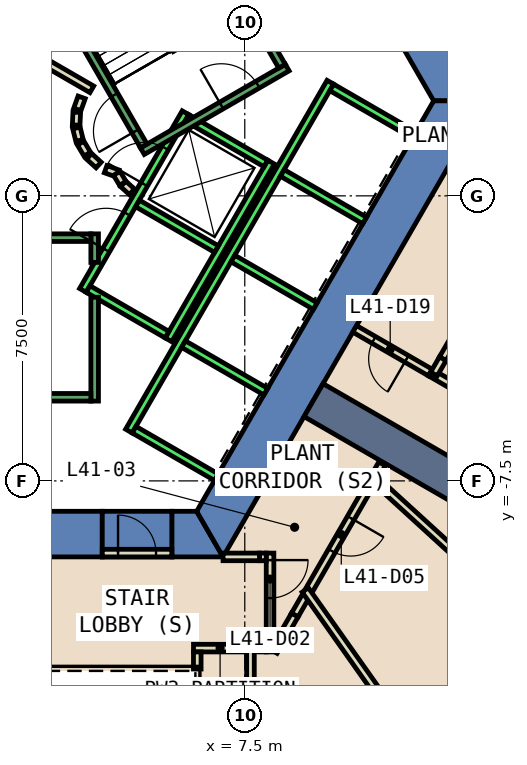
"""IFC4 building model, lengths in metres.
Left out: names, types, materials, properties, quantities, classifications, styles, units other than length and angle.
Written with IfcOpenShell. Run it as: python <this file> out.ifc"""

import sys

from ifc_helpers import new_model, si_unit, direction, frame, frame_2d, origin, place, context, subcontext, project, spatial, polyline, rectangle, outline, extrude, element, fill, save


model = new_model("IFC4")
c1 = context("Model", 3, precision=1e-05, world=origin(), true_north=direction((0.0, 1.0)))
c2 = subcontext(c1, "Body", "Model", "MODEL_VIEW")
j1 = project(units=[si_unit("LENGTHUNIT", "METRE"), si_unit("PLANEANGLEUNIT", "RADIAN")], contexts=[c1])
p1 = place(None, origin())
s1 = spatial("IfcSite", under=j1, at=p1, CompositionType="ELEMENT")
p2 = place(p1, origin())
s2 = spatial("IfcBuilding", under=s1, at=p2, CompositionType="ELEMENT")
p3 = place(p2, frame((0.0, 0.0, 184.4)))
s3 = spatial("IfcBuildingStorey", under=s2, at=p3, CompositionType="ELEMENT", Elevation=184.4)
p4 = place(p3, frame((0.0, 0.0, -0.6)))
e1 = element("IfcWall", 1, at=p4, inside=s3, PredefinedType="SHEAR", context=c2, shape_type="SweptSolid", body=[
    extrude(outline(polyline([(8.517, 11.747), (7.478, 11.147), (12.471, 2.5), (13.856, 2.5), (8.517, 11.747)])), origin(), (0.0, 0.0, 1.0), 5.4),
])
p5 = place(p3, frame((0.0, 0.0, -0.6)))
e2 = element("IfcWall", 2, at=p5, inside=s3, PredefinedType="SHEAR", context=c2, shape_type="SweptSolid", body=[
    extrude(outline(polyline([(3.75, -9.5), (3.75, -8.3), (-6.235, -8.3), (-6.928, -9.5), (3.75, -9.5)])), origin(), (0.0, 0.0, 1.0), 5.4),
])
p6 = place(p3, frame((0.0, 0.0, -0.6)))
e3 = element("IfcWall", 3, at=p6, inside=s3, PredefinedType="SHEAR", context=c2, shape_type="SweptSolid", body=[
    extrude(outline(polyline([(5.58, -8.3), (5.58, -9.5), (6.928, -9.5), (6.235, -8.3), (5.58, -8.3)])), origin(), (0.0, 0.0, 1.0), 5.4),
])
p7 = place(p3, frame((0.0, 0.0, 3.6)))
e4 = element("IfcWall", 4, at=p7, inside=s3, PredefinedType="SHEAR", context=c2, shape_type="SweptSolid", body=[
    extrude(outline(polyline([(5.58, -9.5), (5.58, -8.3), (3.75, -8.3), (3.75, -9.5), (5.58, -9.5)])), origin(), (0.0, 0.0, 1.0), 1.2),
])
p8 = place(p3, frame((0.0, 0.0, -0.6)))
e5 = element("IfcWall", 5, at=p8, inside=s3, PredefinedType="SHEAR", context=c2, shape_type="SweptSolid", body=[
    extrude(outline(polyline([(6.928, -9.5), (13.856, 2.5), (12.471, 2.5), (6.235, -8.3), (6.928, -9.5)])), origin(), (0.0, 0.0, 1.0), 5.4),
])
p9 = place(p3, frame((9.31, -5.375, 0.0), z_axis=(0.0, 0.0, 1.0), x_axis=(0.866015103238, -0.500017840646, 0.0)))
e6 = element("IfcWall", 6, at=p9, inside=s3, PredefinedType="SHEAR", context=c2, shape_type="SweptSolid", body=[
    extrude(rectangle(XDim=27.139, YDim=1.0, at=frame_2d((13.57, 0.0))), origin(), (0.0, 0.0, 1.0), 4.8),
])
p10 = place(p3, frame((1.866, 3.732, 0.0), z_axis=(0.0, 0.0, 1.0), x_axis=(0.866043361281, -0.499968895414, 0.0)))
e7 = element("IfcWall", 7, at=p10, inside=s3, PredefinedType="PARTITIONING", context=c2, shape_type="SweptSolid", body=[
    extrude(rectangle(XDim=1.858, YDim=0.2, at=frame_2d((0.929, 0.0))), origin(), (0.0, 0.0, 1.0), 4.8),
])
p11 = place(p3, frame((3.208, 2.592, 0.0), z_axis=(0.0, 0.0, 1.0), x_axis=(-0.337388820924, -0.941365382578, 0.0)))
e8 = element("IfcWall", 8, at=p11, inside=s3, PredefinedType="PARTITIONING", context=c2, shape_type="SweptSolid", body=[
    extrude(rectangle(XDim=0.338, YDim=0.2, at=frame_2d((0.169, 0.0))), origin(), (0.0, 0.0, 1.0), 4.8),
])
p12 = place(p3, frame((3.079, 2.199, 0.0), z_axis=(0.0, 0.0, 1.0), x_axis=(-0.047771483479, -0.998858290933, 0.0)))
e9 = element("IfcWall", 9, at=p12, inside=s3, PredefinedType="PARTITIONING", context=c2, shape_type="SweptSolid", body=[
    extrude(rectangle(XDim=0.337, YDim=0.2, at=frame_2d((0.169, 0.0))), origin(), (0.0, 0.0, 1.0), 4.8),
])
p13 = place(p3, frame((3.07, 1.786, 0.0), z_axis=(0.0, 0.0, 1.0), x_axis=(0.242705583207, -0.970099994784, 0.0)))
e10 = element("IfcWall", 10, at=p13, inside=s3, PredefinedType="PARTITIONING", context=c2, shape_type="SweptSolid", body=[
    extrude(rectangle(XDim=0.338, YDim=0.2, at=frame_2d((0.169, 0.0))), origin(), (0.0, 0.0, 1.0), 4.8),
])
for number, where, z_axis, x_axis in (
    (11, (3.182, 1.388, 0.0), (0.0, 0.0, 1.0), (0.512, -0.859, 0.0)),
    (12, (3.404, 1.039, 0.0), (0.0, 0.0, 1.0), (0.74, -0.672, 0.0)),
):
    element("IfcWall", number, at=place(p3, frame(where, z_axis=z_axis, x_axis=x_axis)), inside=s3, PredefinedType="PARTITIONING", context=c2, shape_type="SweptSolid", body=[
        extrude(rectangle(XDim=0.338, YDim=0.2, at=frame_2d((0.169, 0.0))), origin(), (0.0, 0.0, 1.0), 4.8),
    ])
p14 = place(p3, frame((3.838, 0.702, 0.0), z_axis=(0.0, 0.0, 1.0), x_axis=(0.941035081519, -0.338308993895, 0.0)))
e13 = element("IfcWall", 13, at=p14, inside=s3, PredefinedType="PARTITIONING", context=c2, shape_type="SweptSolid", body=[
    extrude(rectangle(XDim=0.337, YDim=0.2, at=frame_2d((0.168, 0.0))), origin(), (0.0, 0.0, 1.0), 4.8),
])
p15 = place(p3, frame((4.132, 0.593, 0.0), z_axis=(0.0, 0.0, 1.0), x_axis=(0.513561617048, -0.858052717201, 0.0)))
e14 = element("IfcWall", 14, at=p15, inside=s3, PredefinedType="PARTITIONING", context=c2, shape_type="SweptSolid", body=[
    extrude(rectangle(XDim=0.308, YDim=0.2, at=frame_2d((0.154, 0.0))), origin(), (0.0, 0.0, 1.0), 4.8),
])
p16 = place(p3, frame((4.301, 0.315, 0.0), z_axis=(0.0, 0.0, 1.0), x_axis=(0.741798017506, -0.670623367639, 0.0)))
e15 = element("IfcWall", 15, at=p16, inside=s3, PredefinedType="PARTITIONING", context=c2, shape_type="SweptSolid", body=[
    extrude(rectangle(XDim=0.309, YDim=0.2, at=frame_2d((0.154, 0.0))), origin(), (0.0, 0.0, 1.0), 4.8),
])
p17 = place(p3, frame((7.55, -11.9, 0.0), z_axis=(0.0, 0.0, 1.0), x_axis=(-1.0, 0.0, 0.0)))
e16 = element("IfcWall", 16, at=p17, inside=s3, PredefinedType="PARTITIONING", context=c2, shape_type="SweptSolid", body=[
    extrude(rectangle(XDim=1.399, YDim=0.2, at=frame_2d((0.7, 0.0))), origin(), (0.0, 0.0, 1.0), 4.8),
])
p18 = place(p3, frame((6.25, -12.0, 0.0), z_axis=(0.0, 0.0, 1.0), x_axis=(0.0, -1.0, 0.0)))
e17 = element("IfcWall", 17, at=p18, inside=s3, PredefinedType="PARTITIONING", context=c2, shape_type="SweptSolid", body=[
    extrude(rectangle(XDim=0.45, YDim=0.2, at=frame_2d((0.225, 0.0))), origin(), (0.0, 0.0, 1.0), 4.8),
])
p19 = place(p3, frame((6.928, -9.5, 0.0), z_axis=(0.0, 0.0, 1.0), x_axis=(1.0, 0.0, 0.0)))
e18 = element("IfcWall", 18, at=p19, inside=s3, PredefinedType="PARTITIONING", context=c2, shape_type="SweptSolid", body=[
    extrude(rectangle(XDim=0.962, YDim=0.2, at=frame_2d((0.481, 0.0))), origin(), (0.0, 0.0, 1.0), 2.4),
])
p20 = place(p3, frame((8.165, -9.4, 0.0), z_axis=(0.0, 0.0, 1.0), x_axis=(0.0, -1.0, 0.0)))
e19 = element("IfcWall", 19, at=p20, inside=s3, PredefinedType="PARTITIONING", context=c2, shape_type="SweptSolid", body=[
    extrude(rectangle(XDim=2.6, YDim=0.2, at=frame_2d((1.3, 0.0))), origin(), (0.0, 0.0, 1.0), 4.8),
])
p21 = place(p20, frame((0.184, 0.0, 0.0)))
e20 = element("IfcOpeningElement", 20, at=p21, cuts=e19, PredefinedType="OPENING", context=c2, shape_type="SweptSolid", body=[
    extrude(rectangle(XDim=1.0, YDim=2.1, at=frame_2d((0.5, 1.05))), frame((0.0, 0.11, 0.0), z_axis=(0.0, -1.0, 0.0), x_axis=(1.0, 0.0, 0.0)), (0.0, 0.0, 1.0), 0.22),
])
p22 = place(p3, frame((8.065, -11.9, 0.0), z_axis=(0.0, 0.0, 1.0), x_axis=(-1.0, 0.0, 0.0)))
e21 = element("IfcWall", 21, at=p22, inside=s3, PredefinedType="PARTITIONING", context=c2, shape_type="SweptSolid", body=[
    extrude(rectangle(XDim=0.315, YDim=0.2, at=frame_2d((0.157, 0.0))), origin(), (0.0, 0.0, 1.0), 4.8),
])
p23 = place(p3, frame((7.65, -11.8, 0.0), z_axis=(0.0, 0.0, 1.0), x_axis=(0.0, -1.0, 0.0)))
e22 = element("IfcWall", 22, at=p23, inside=s3, PredefinedType="PARTITIONING", context=c2, shape_type="SweptSolid", body=[
    extrude(rectangle(XDim=13.349, YDim=0.2, at=frame_2d((6.674, 0.0))), origin(), (0.0, 0.0, 1.0), 4.8),
])
p24 = place(p23, frame((6.867, 0.0, 0.0)))
e23 = element("IfcOpeningElement", 23, at=p24, cuts=e22, PredefinedType="OPENING", context=c2, shape_type="SweptSolid", body=[
    extrude(rectangle(XDim=1.0, YDim=2.1, at=frame_2d((0.5, 1.05))), frame((0.0, 0.11, 0.0), z_axis=(0.0, -1.0, 0.0), x_axis=(1.0, 0.0, 0.0)), (0.0, 0.0, 1.0), 0.22),
])
p25 = place(p3, frame((9.15, -10.451, 0.0), z_axis=(0.0, 0.0, 1.0), x_axis=(-0.499595985407, -0.8662585361, 0.0)))
e24 = element("IfcWall", 24, at=p25, inside=s3, PredefinedType="PARTITIONING", context=c2, shape_type="SweptSolid", body=[
    extrude(rectangle(XDim=0.668, YDim=0.2, at=frame_2d((0.334, 0.0))), origin(), (0.0, 0.0, 1.0), 4.8),
])
p26 = place(p3, frame((10.89, -7.437, 0.0), z_axis=(0.0, 0.0, 1.0), x_axis=(-0.499979528911, -0.866037222451, 0.0)))
e25 = element("IfcWall", 25, at=p26, inside=s3, PredefinedType="PARTITIONING", context=c2, shape_type="SweptSolid", body=[
    extrude(rectangle(XDim=3.48, YDim=0.2, at=frame_2d((1.74, 0.0))), origin(), (0.0, 0.0, 1.0), 4.8),
])
p27 = place(p26, frame((1.202, 0.0, 0.0)))
e26 = element("IfcOpeningElement", 26, at=p27, cuts=e25, PredefinedType="OPENING", context=c2, shape_type="SweptSolid", body=[
    extrude(rectangle(XDim=1.0, YDim=2.1, at=frame_2d((0.5, 1.05))), frame((0.0, 0.11, 0.0), z_axis=(0.0, -1.0, 0.0), x_axis=(1.0, 0.0, 0.0)), (0.0, 0.0, 1.0), 0.22),
])
p28 = place(p3, frame((11.113, -7.051, 0.0), z_axis=(0.0, 0.0, 1.0), x_axis=(-0.499207881238, -0.866482251007, 0.0)))
e27 = element("IfcWall", 27, at=p28, inside=s3, PredefinedType="PARTITIONING", context=c2, shape_type="SweptSolid", body=[
    extrude(rectangle(XDim=0.411, YDim=0.2, at=frame_2d((0.206, 0.0))), origin(), (0.0, 0.0, 1.0), 2.4),
])
p29 = place(p3, frame((9.092, -10.37, 0.0), z_axis=(0.0, 0.0, 1.0), x_axis=(0.57710323801, -0.816671202308, 0.0)))
e28 = element("IfcWall", 28, at=p29, inside=s3, PredefinedType="PARTITIONING", context=c2, shape_type="SweptSolid", body=[
    extrude(rectangle(XDim=19.393, YDim=0.2, at=frame_2d((9.697, 0.0))), origin(), (0.0, 0.0, 1.0), 4.8),
])
p30 = place(p3, frame((10.816, -7.37, 0.0), z_axis=(0.0, 0.0, 1.0), x_axis=(0.738734088882, -0.673996992519, 0.0)))
e29 = element("IfcWall", 29, at=p30, inside=s3, PredefinedType="PARTITIONING", context=c2, shape_type="SweptSolid", body=[
    extrude(rectangle(XDim=13.69, YDim=0.2, at=frame_2d((6.845, 0.0))), origin(), (0.0, 0.0, 1.0), 2.4),
])
p31 = place(p3, frame((12.384, -4.65, 0.0), z_axis=(0.0, 0.0, 1.0), x_axis=(-0.866053019151, 0.499952165731, 0.0)))
e30 = element("IfcWall", 30, at=p31, inside=s3, PredefinedType="PARTITIONING", context=c2, shape_type="SweptSolid", body=[
    extrude(rectangle(XDim=2.3, YDim=0.2, at=frame_2d((1.15, 0.0))), origin(), (0.0, 0.0, 1.0), 4.8),
])
p32 = place(p31, frame((0.721, 0.0, 0.0)))
e31 = element("IfcOpeningElement", 31, at=p32, cuts=e30, PredefinedType="OPENING", context=c2, shape_type="SweptSolid", body=[
    extrude(rectangle(XDim=1.0, YDim=2.1, at=frame_2d((0.5, 1.05))), frame((0.0, 0.11, 0.0), z_axis=(0.0, -1.0, 0.0), x_axis=(1.0, 0.0, 0.0)), (0.0, 0.0, 1.0), 0.22),
])
p33 = place(p3, frame((12.384, -4.65, 0.0), z_axis=(0.0, 0.0, 1.0), x_axis=(0.866042267005, -0.499970790907, 0.0)))
e32 = element("IfcWall", 32, at=p33, inside=s3, PredefinedType="PARTITIONING", context=c2, shape_type="SweptSolid", body=[
    extrude(rectangle(XDim=25.02, YDim=0.2, at=frame_2d((12.51, 0.0))), origin(), (0.0, 0.0, 1.0), 4.8),
])
p34 = place(p3, frame((3.75, -9.4, 0.0), z_axis=(0.0, 0.0, 1.0), x_axis=(1.0, 0.0, 0.0)))
e33 = element("IfcWall", 33, at=p34, inside=s3, PredefinedType="PARTITIONING", context=c2, shape_type="SweptSolid", body=[
    extrude(rectangle(XDim=1.83, YDim=0.2, at=frame_2d((0.915, 0.0))), origin(), (0.0, 0.0, 1.0), 2.4),
])
p35 = place(p34, frame((0.415, 0.0, 0.0)))
e34 = element("IfcOpeningElement", 34, at=p35, cuts=e33, PredefinedType="OPENING", context=c2, shape_type="SweptSolid", body=[
    extrude(rectangle(XDim=1.0, YDim=2.1, at=frame_2d((0.5, 1.05))), frame((0.0, 0.11, 0.0), z_axis=(0.0, -1.0, 0.0), x_axis=(1.0, 0.0, 0.0)), (0.0, 0.0, 1.0), 0.22),
])
p36 = place(p3, frame((7.89, -9.5, 0.0), z_axis=(0.0, 0.0, 1.0), x_axis=(1.0, 0.0, 0.0)))
e35 = element("IfcWall", 35, at=p36, inside=s3, PredefinedType="PARTITIONING", context=c2, shape_type="SweptSolid", body=[
    extrude(rectangle(XDim=0.175, YDim=0.2, at=frame_2d((0.087, 0.0))), origin(), (0.0, 0.0, 1.0), 4.8),
])
p37 = place(p3, frame((8.816, -11.03, 0.0), z_axis=(0.0, 0.0, 1.0), x_axis=(-0.499633176362, -0.866237085952, 0.0)))
e36 = element("IfcWall", 36, at=p37, inside=s3, PredefinedType="PARTITIONING", context=c2, shape_type="SweptSolid", body=[
    extrude(rectangle(XDim=1.105, YDim=0.2, at=frame_2d((0.552, 0.0))), origin(), (0.0, 0.0, 1.0), 2.4),
])
p38 = place(p3, frame((13.168, -3.493, 0.0), z_axis=(0.0, 0.0, 1.0), x_axis=(-0.500153222552, -0.865936922628, 0.0)))
e37 = element("IfcWall", 37, at=p38, inside=s3, PredefinedType="PARTITIONING", context=c2, shape_type="SweptSolid", body=[
    extrude(rectangle(XDim=0.916, YDim=0.2, at=frame_2d((0.458, 0.0))), origin(), (0.0, 0.0, 1.0), 2.4),
])
p39 = place(p3, frame((12.71, -4.286, 0.0), z_axis=(0.0, 0.0, 1.0), x_axis=(-0.500558482794, -0.8657027234, 0.0)))
e38 = element("IfcWall", 38, at=p39, inside=s3, PredefinedType="PARTITIONING", context=c2, shape_type="SweptSolid", body=[
    extrude(rectangle(XDim=0.463, YDim=0.2, at=frame_2d((0.232, 0.0))), origin(), (0.0, 0.0, 1.0), 4.8),
])
p40 = place(p3, frame((3.24, -2.488, 0.0), z_axis=(0.0, 0.0, 1.0), x_axis=(0.500034260056, 0.866005622828, 0.0)))
e39 = element("IfcWall", 39, at=p40, inside=s3, PredefinedType="STANDARD", context=c2, shape_type="SweptSolid", body=[
    extrude(rectangle(XDim=5.399, YDim=0.2, at=frame_2d((2.7, 0.0))), origin(), (0.0, 0.0, 1.0), 4.8),
])
p41 = place(p40, frame((3.225, 0.0, 0.0)))
e40 = element("IfcOpeningElement", 40, at=p41, cuts=e39, PredefinedType="OPENING", context=c2, shape_type="SweptSolid", body=[
    extrude(rectangle(XDim=1.1, YDim=2.1, at=frame_2d((0.55, 1.05))), frame((0.0, 0.11, 0.0), z_axis=(0.0, -1.0, 0.0), x_axis=(1.0, 0.0, 0.0)), (0.0, 0.0, 1.0), 0.22),
])
p42 = place(p40, frame((1.225, 0.0, 0.0)))
e41 = element("IfcOpeningElement", 41, at=p42, cuts=e39, PredefinedType="OPENING", context=c2, shape_type="SweptSolid", body=[
    extrude(rectangle(XDim=1.1, YDim=2.1, at=frame_2d((0.55, 1.05))), frame((0.0, 0.11, 0.0), z_axis=(0.0, -1.0, 0.0), x_axis=(1.0, 0.0, 0.0)), (0.0, 0.0, 1.0), 0.22),
])
p43 = place(p3, frame((5.492, -3.788, 0.0), z_axis=(0.0, 0.0, 1.0), x_axis=(0.500034260056, 0.866005622828, 0.0)))
e42 = element("IfcWall", 42, at=p43, inside=s3, PredefinedType="STANDARD", context=c2, shape_type="SweptSolid", body=[
    extrude(rectangle(XDim=5.399, YDim=0.2, at=frame_2d((2.7, 0.0))), origin(), (0.0, 0.0, 1.0), 4.8),
])
p44 = place(p3, frame((3.377, -2.452, 0.0), z_axis=(0.0, 0.0, 1.0), x_axis=(0.865955154139, -0.50012165622, 0.0)))
e43 = element("IfcWall", 43, at=p44, inside=s3, PredefinedType="STANDARD", context=c2, shape_type="SweptSolid", body=[
    extrude(rectangle(XDim=2.4, YDim=0.2, at=frame_2d((1.2, 0.0))), origin(), (0.0, 0.0, 1.0), 4.8),
])
for number, where, z_axis, x_axis in (
    (44, (4.677, -0.2, 0.0), (0.0, 0.0, 1.0), (0.866, -0.5, 0.0)),
    (45, (5.977, 2.052, 0.0), (0.0, 0.0, 1.0), (0.866, -0.5, 0.0)),
):
    element("IfcWall", number, at=place(p3, frame(where, z_axis=z_axis, x_axis=x_axis)), inside=s3, PredefinedType="STANDARD", context=c2, shape_type="SweptSolid", body=[
        extrude(rectangle(XDim=2.399, YDim=0.2, at=frame_2d((1.2, 0.0))), origin(), (0.0, 0.0, 1.0), 4.8),
    ])
p45 = place(p3, frame((4.451, -6.19, 0.0), z_axis=(0.0, 0.0, 1.0), x_axis=(0.50000090737, 0.866024879913, 0.0)))
e46 = element("IfcWall", 46, at=p45, inside=s3, PredefinedType="STANDARD", context=c2, shape_type="SweptSolid", body=[
    extrude(rectangle(XDim=10.6, YDim=0.2, at=frame_2d((5.3, 0.0))), origin(), (0.0, 0.0, 1.0), 4.8),
])
for number, where, z_axis, x_axis in (
    (47, (4.588, -6.153, 0.0), (0.0, 0.0, 1.0), (0.866, -0.5, 0.0)),
    (48, (5.888, -3.902, 0.0), (0.0, 0.0, 1.0), (0.866, -0.5, 0.0)),
    (49, (7.188, -1.65, 0.0), (0.0, 0.0, 1.0), (0.866, -0.5, 0.0)),
    (50, (8.488, 0.602, 0.0), (0.0, 0.0, 1.0), (0.866, -0.5, 0.0)),
):
    element("IfcWall", number, at=place(p3, frame(where, z_axis=z_axis, x_axis=x_axis)), inside=s3, PredefinedType="STANDARD", context=c2, shape_type="SweptSolid", body=[
        extrude(rectangle(XDim=2.5, YDim=0.2, at=frame_2d((1.25, 0.0))), origin(), (0.0, 0.0, 1.0), 4.8),
    ])
p46 = place(p3, frame((9.788, 2.853, 0.0), z_axis=(0.0, 0.0, 1.0), x_axis=(0.865998541277, -0.500046524342, 0.0)))
e51 = element("IfcWall", 51, at=p46, inside=s3, PredefinedType="STANDARD", context=c2, shape_type="SweptSolid", body=[
    extrude(rectangle(XDim=2.5, YDim=0.2, at=frame_2d((1.25, 0.0))), origin(), (0.0, 0.0, 1.0), 4.8),
])
p47 = place(p3, frame((3.55, -2.667, 0.0), z_axis=(0.0, 0.0, 1.0), x_axis=(0.0, -1.0, 0.0)))
e52 = element("IfcWall", 52, at=p47, inside=s3, PredefinedType="STANDARD", context=c2, shape_type="SweptSolid", body=[
    extrude(rectangle(XDim=2.733, YDim=0.2, at=frame_2d((1.366, 0.0))), origin(), (0.0, 0.0, 1.0), 4.8),
])
p48 = place(p3, frame((3.55, -1.0, 0.0), z_axis=(0.0, 0.0, 1.0), x_axis=(0.0, -1.0, 0.0)))
e53 = element("IfcWall", 53, at=p48, inside=s3, PredefinedType="STANDARD", context=c2, shape_type="SweptSolid", body=[
    extrude(rectangle(XDim=0.751, YDim=0.2, at=frame_2d((0.375, 0.0))), origin(), (0.0, 0.0, 1.0), 4.8),
])
p49 = place(p3, frame((-3.45, -1.1, 0.0), z_axis=(0.0, 0.0, 1.0), x_axis=(1.0, 0.0, 0.0)))
e54 = element("IfcWall", 54, at=p49, inside=s3, PredefinedType="STANDARD", context=c2, shape_type="SweptSolid", body=[
    extrude(rectangle(XDim=6.9, YDim=0.2, at=frame_2d((3.45, 0.0))), origin(), (0.0, 0.0, 1.0), 4.8),
])
p50 = place(p49, frame((0.45, 0.0, 0.0)))
e55 = element("IfcOpeningElement", 55, at=p50, cuts=e54, PredefinedType="OPENING", context=c2, shape_type="SweptSolid", body=[
    extrude(rectangle(XDim=1.1, YDim=2.2, at=frame_2d((0.55, 1.1))), frame((0.0, 0.11, 0.0), z_axis=(0.0, -1.0, 0.0), x_axis=(1.0, 0.0, 0.0)), (0.0, 0.0, 1.0), 0.22),
])
p51 = place(p3, frame((-3.45, -5.3, 0.0), z_axis=(0.0, 0.0, 1.0), x_axis=(1.0, 0.0, 0.0)))
e56 = element("IfcWall", 56, at=p51, inside=s3, PredefinedType="STANDARD", context=c2, shape_type="SweptSolid", body=[
    extrude(rectangle(XDim=6.9, YDim=0.2, at=frame_2d((3.45, 0.0))), origin(), (0.0, 0.0, 1.0), 4.8),
])
p52 = place(p3, frame((4.806, 1.176, 0.0), z_axis=(0.0, 0.0, 1.0), x_axis=(0.866059941101, 0.499940174841, 0.0)))
e57 = element("IfcWall", 57, at=p52, inside=s3, PredefinedType="STANDARD", context=c2, shape_type="SweptSolid", body=[
    extrude(rectangle(XDim=4.4, YDim=0.2, at=frame_2d((2.2, 0.0))), origin(), (0.0, 0.0, 1.0), 4.8),
])
p53 = place(p52, frame((2.4, 0.0, 0.0)))
e58 = element("IfcOpeningElement", 58, at=p53, cuts=e57, PredefinedType="OPENING", context=c2, shape_type="SweptSolid", body=[
    extrude(rectangle(XDim=1.1, YDim=2.2, at=frame_2d((0.55, 1.1))), frame((0.0, 0.11, 0.0), z_axis=(0.0, -1.0, 0.0), x_axis=(1.0, 0.0, 0.0)), (0.0, 0.0, 1.0), 0.22),
])
p54 = place(p3, frame((4.843, 1.312, 0.0), z_axis=(0.0, 0.0, 1.0), x_axis=(-0.499963383562, 0.866046543262, 0.0)))
e59 = element("IfcWall", 59, at=p54, inside=s3, PredefinedType="STANDARD", context=c2, shape_type="SweptSolid", body=[
    extrude(rectangle(XDim=6.9, YDim=0.2, at=frame_2d((3.45, 0.0))), origin(), (0.0, 0.0, 1.0), 4.8),
])
p55 = place(p54, frame((0.45, 0.0, 0.0)))
e60 = element("IfcOpeningElement", 60, at=p55, cuts=e59, PredefinedType="OPENING", context=c2, shape_type="SweptSolid", body=[
    extrude(rectangle(XDim=1.1, YDim=2.2, at=frame_2d((0.55, 1.1))), frame((0.0, 0.11, 0.0), z_axis=(0.0, -1.0, 0.0), x_axis=(1.0, 0.0, 0.0)), (0.0, 0.0, 1.0), 0.22),
])
p56 = place(p3, frame((8.48, 3.412, 0.0), z_axis=(0.0, 0.0, 1.0), x_axis=(-0.499978703459, 0.866037698999, 0.0)))
e61 = element("IfcWall", 61, at=p56, inside=s3, PredefinedType="STANDARD", context=c2, shape_type="SweptSolid", body=[
    extrude(rectangle(XDim=6.9, YDim=0.2, at=frame_2d((3.45, 0.0))), origin(), (0.0, 0.0, 1.0), 4.8),
])
p57 = place(p21, origin())
e62 = element("IfcDoor", 62, at=p57, inside=s3, OperationType="SINGLE_SWING_RIGHT", PredefinedType="DOOR", context=c2, shape_type="SweptSolid", body=[
    extrude(rectangle(XDim=1.0, YDim=2.1, at=frame_2d((0.5, 1.05))), frame((0.0, 0.025, 0.0), z_axis=(0.0, -1.0, 0.0), x_axis=(1.0, 0.0, 0.0)), (0.0, 0.0, 1.0), 0.05),
])
fill(e20, e62)
p58 = place(p27, origin())
e63 = element("IfcDoor", 63, at=p58, inside=s3, OperationType="SINGLE_SWING_LEFT", PredefinedType="DOOR", context=c2, shape_type="SweptSolid", body=[
    extrude(rectangle(XDim=1.0, YDim=2.1, at=frame_2d((0.5, 1.05))), frame((0.0, 0.025, 0.0), z_axis=(0.0, -1.0, 0.0), x_axis=(1.0, 0.0, 0.0)), (0.0, 0.0, 1.0), 0.05),
])
fill(e26, e63)
p59 = place(p32, origin())
e64 = element("IfcDoor", 64, at=p59, inside=s3, OperationType="SINGLE_SWING_LEFT", PredefinedType="DOOR", context=c2, shape_type="SweptSolid", body=[
    extrude(rectangle(XDim=1.0, YDim=2.1, at=frame_2d((0.5, 1.05))), frame((0.0, 0.025, 0.0), z_axis=(0.0, -1.0, 0.0), x_axis=(1.0, 0.0, 0.0)), (0.0, 0.0, 1.0), 0.05),
])
fill(e31, e64)
p60 = place(p35, origin())
e65 = element("IfcDoor", 65, at=p60, inside=s3, OperationType="SINGLE_SWING_LEFT", PredefinedType="DOOR", context=c2, shape_type="SweptSolid", body=[
    extrude(rectangle(XDim=1.0, YDim=2.1, at=frame_2d((0.5, 1.05))), frame((0.0, 0.025, 0.0), z_axis=(0.0, -1.0, 0.0), x_axis=(1.0, 0.0, 0.0)), (0.0, 0.0, 1.0), 0.05),
])
fill(e34, e65)
p61 = place(p41, origin())
e66 = element("IfcDoor", 66, at=p61, inside=s3, OperationType="SLIDING_TO_LEFT", PredefinedType="DOOR", context=c2, shape_type="SweptSolid", body=[
    extrude(rectangle(XDim=1.1, YDim=2.1, at=frame_2d((0.55, 1.05))), frame((0.0, 0.025, 0.0), z_axis=(0.0, -1.0, 0.0), x_axis=(1.0, 0.0, 0.0)), (0.0, 0.0, 1.0), 0.05),
])
fill(e40, e66)
p62 = place(p42, origin())
e67 = element("IfcDoor", 67, at=p62, inside=s3, OperationType="SLIDING_TO_LEFT", PredefinedType="DOOR", context=c2, shape_type="SweptSolid", body=[
    extrude(rectangle(XDim=1.1, YDim=2.1, at=frame_2d((0.55, 1.05))), frame((0.0, 0.025, 0.0), z_axis=(0.0, -1.0, 0.0), x_axis=(1.0, 0.0, 0.0)), (0.0, 0.0, 1.0), 0.05),
])
fill(e41, e67)
p63 = place(p55, origin())
e68 = element("IfcDoor", 68, at=p63, inside=s3, OperationType="SINGLE_SWING_LEFT", PredefinedType="DOOR", context=c2, shape_type="SweptSolid", body=[
    extrude(rectangle(XDim=1.1, YDim=2.2, at=frame_2d((0.55, 1.1))), frame((0.0, 0.025, 0.0), z_axis=(0.0, -1.0, 0.0), x_axis=(1.0, 0.0, 0.0)), (0.0, 0.0, 1.0), 0.05),
])
fill(e60, e68)
p64 = place(p53, origin())
e69 = element("IfcDoor", 69, at=p64, inside=s3, OperationType="SINGLE_SWING_LEFT", PredefinedType="DOOR", context=c2, shape_type="SweptSolid", body=[
    extrude(rectangle(XDim=1.1, YDim=2.2, at=frame_2d((0.55, 1.1))), frame((0.0, 0.025, 0.0), z_axis=(0.0, -1.0, 0.0), x_axis=(1.0, 0.0, 0.0)), (0.0, 0.0, 1.0), 0.05),
])
fill(e58, e69)
save(model, sys.argv[1])
